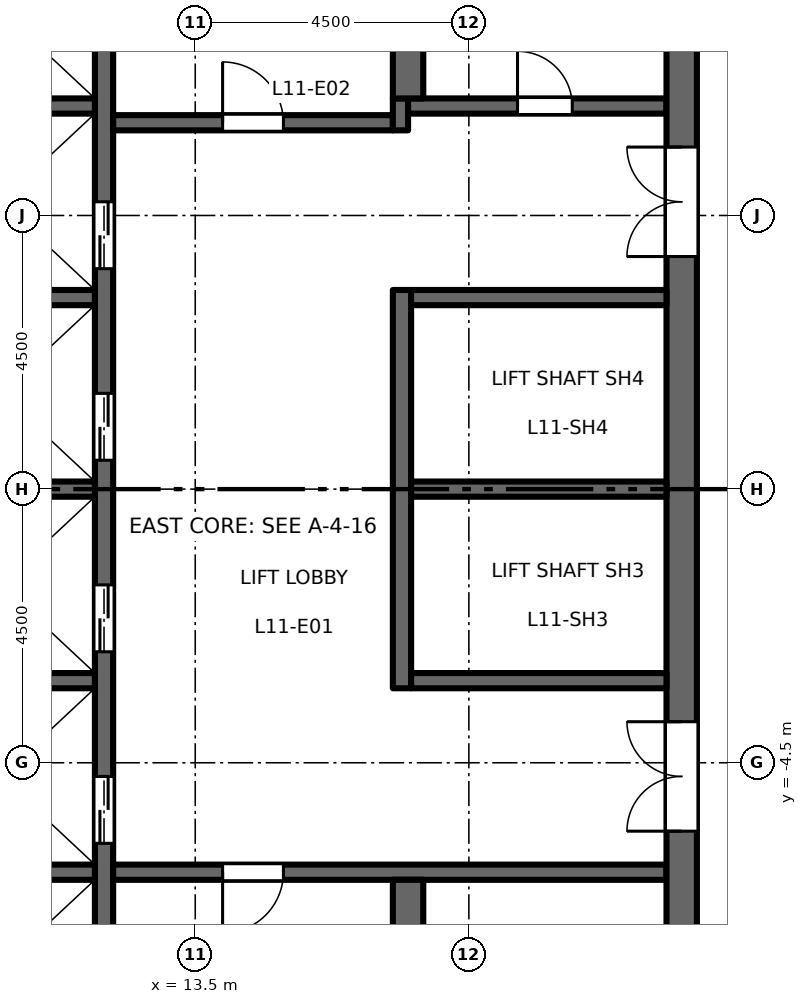
"""IFC4 building model, lengths in metres.
Left out: names, types, materials, properties, quantities, classifications, styles, units other than length and angle.
Written with IfcOpenShell. Run it as: python <this file> out.ifc"""

import sys

from ifc_helpers import new_model, si_unit, direction, frame, frame_2d, origin, place, context, subcontext, project, spatial, rectangle, extrude, element, fill, save


model = new_model("IFC4")
c1 = context("Model", 3, precision=1e-05, world=origin(), true_north=direction((0.0, 1.0)))
c2 = subcontext(c1, "Body", "Model", "MODEL_VIEW")
j1 = project(units=[si_unit("LENGTHUNIT", "METRE"), si_unit("PLANEANGLEUNIT", "RADIAN")], contexts=[c1])
p1 = place(None, origin())
s1 = spatial("IfcSite", under=j1, at=p1, CompositionType="ELEMENT")
p2 = place(p1, origin())
s2 = spatial("IfcBuilding", under=s1, at=p2, CompositionType="ELEMENT")
p3 = place(p2, frame((0.0, 0.0, 53.7)))
s3 = spatial("IfcBuildingStorey", under=s2, at=p3, CompositionType="ELEMENT", Elevation=53.7)
p4 = place(p3, frame((12.0, -9.45, 0.0), z_axis=(0.0, 0.0, 1.0), x_axis=(0.0, 1.0, 0.0)))
e1 = element("IfcWall", 1, at=p4, inside=s3, PredefinedType="SHEAR", context=c2, shape_type="SweptSolid", body=[
    extrude(rectangle(XDim=18.9, YDim=0.3, at=frame_2d((9.45, 0.0))), origin(), (0.0, 0.0, 1.0), 4.35),
])
p5 = place(p4, frame((3.625, 0.0, 0.0)))
e2 = element("IfcOpeningElement", 2, at=p5, cuts=e1, PredefinedType="OPENING", context=c2, shape_type="SweptSolid", body=[
    extrude(rectangle(XDim=1.1, YDim=2.1, at=frame_2d((0.55, 1.05))), frame((0.0, 0.16, 0.0), z_axis=(0.0, -1.0, 0.0), x_axis=(1.0, 0.0, 0.0)), (0.0, 0.0, 1.0), 0.32),
])
p6 = place(p4, frame((6.775, 0.0, 0.0)))
e3 = element("IfcOpeningElement", 3, at=p6, cuts=e1, PredefinedType="OPENING", context=c2, shape_type="SweptSolid", body=[
    extrude(rectangle(XDim=1.1, YDim=2.1, at=frame_2d((0.55, 1.05))), frame((0.0, 0.16, 0.0), z_axis=(0.0, -1.0, 0.0), x_axis=(1.0, 0.0, 0.0)), (0.0, 0.0, 1.0), 0.32),
])
p7 = place(p4, frame((9.925, 0.0, 0.0)))
e4 = element("IfcOpeningElement", 4, at=p7, cuts=e1, PredefinedType="OPENING", context=c2, shape_type="SweptSolid", body=[
    extrude(rectangle(XDim=1.1, YDim=2.1, at=frame_2d((0.55, 1.05))), frame((0.0, 0.16, 0.0), z_axis=(0.0, -1.0, 0.0), x_axis=(1.0, 0.0, 0.0)), (0.0, 0.0, 1.0), 0.32),
])
p8 = place(p4, frame((13.075, 0.0, 0.0)))
e5 = element("IfcOpeningElement", 5, at=p8, cuts=e1, PredefinedType="OPENING", context=c2, shape_type="SweptSolid", body=[
    extrude(rectangle(XDim=1.1, YDim=2.1, at=frame_2d((0.55, 1.05))), frame((0.0, 0.16, 0.0), z_axis=(0.0, -1.0, 0.0), x_axis=(1.0, 0.0, 0.0)), (0.0, 0.0, 1.0), 0.32),
])
p9 = place(p4, frame((16.725, 0.0, 0.0)))
e6 = element("IfcOpeningElement", 6, at=p9, cuts=e1, PredefinedType="OPENING", context=c2, shape_type="SweptSolid", body=[
    extrude(rectangle(XDim=1.2, YDim=2.1, at=frame_2d((0.6, 1.05))), frame((0.0, 0.16, 0.0), z_axis=(0.0, -1.0, 0.0), x_axis=(1.0, 0.0, 0.0)), (0.0, 0.0, 1.0), 0.32),
])
p10 = place(p4, frame((0.975, 0.0, 0.0)))
e7 = element("IfcOpeningElement", 7, at=p10, cuts=e1, PredefinedType="OPENING", context=c2, shape_type="SweptSolid", body=[
    extrude(rectangle(XDim=1.2, YDim=2.1, at=frame_2d((0.6, 1.05))), frame((0.0, 0.16, 0.0), z_axis=(0.0, -1.0, 0.0), x_axis=(1.0, 0.0, 0.0)), (0.0, 0.0, 1.0), 0.32),
])
p11 = place(p3, frame((12.15, 6.025, 0.0), z_axis=(0.0, 0.0, 1.0), x_axis=(1.0, 0.0, 0.0)))
e8 = element("IfcWall", 8, at=p11, inside=s3, PredefinedType="SHEAR", context=c2, shape_type="SweptSolid", body=[
    extrude(rectangle(XDim=4.6, YDim=0.25, at=frame_2d((2.3, 0.0))), origin(), (0.0, 0.0, 1.0), 4.35),
])
p12 = place(p11, frame((1.8, 0.0, 0.0)))
e9 = element("IfcOpeningElement", 9, at=p12, cuts=e8, PredefinedType="OPENING", context=c2, shape_type="SweptSolid", body=[
    extrude(rectangle(XDim=1.0, YDim=2.1, at=frame_2d((0.5, 1.05))), frame((0.0, 0.135, 0.0), z_axis=(0.0, -1.0, 0.0), x_axis=(1.0, 0.0, 0.0)), (0.0, 0.0, 1.0), 0.27),
])
p13 = place(p3, frame((16.875, 5.9, 0.0), z_axis=(0.0, 0.0, 1.0), x_axis=(0.0, 1.0, 0.0)))
e10 = element("IfcWall", 10, at=p13, inside=s3, PredefinedType="SHEAR", context=c2, shape_type="SweptSolid", body=[
    extrude(rectangle(XDim=0.525, YDim=0.25, at=frame_2d((0.263, 0.0))), origin(), (0.0, 0.0, 1.0), 4.35),
])
p14 = place(p3, frame((17.0, 6.3, 0.0), z_axis=(0.0, 0.0, 1.0), x_axis=(1.0, 0.0, 0.0)))
e11 = element("IfcWall", 11, at=p14, inside=s3, PredefinedType="SHEAR", context=c2, shape_type="SweptSolid", body=[
    extrude(rectangle(XDim=4.25, YDim=0.25, at=frame_2d((2.125, 0.0))), origin(), (0.0, 0.0, 1.0), 4.35),
])
p15 = place(p14, frame((1.8, 0.0, 0.0)))
e12 = element("IfcOpeningElement", 12, at=p15, cuts=e11, PredefinedType="OPENING", context=c2, shape_type="SweptSolid", body=[
    extrude(rectangle(XDim=0.9, YDim=2.1, at=frame_2d((0.45, 1.05))), frame((0.0, 0.135, 0.0), z_axis=(0.0, -1.0, 0.0), x_axis=(1.0, 0.0, 0.0)), (0.0, 0.0, 1.0), 0.27),
])
p16 = place(p3, frame((12.15, -6.3, 0.0), z_axis=(0.0, 0.0, 1.0), x_axis=(1.0, 0.0, 0.0)))
e13 = element("IfcWall", 13, at=p16, inside=s3, PredefinedType="SHEAR", context=c2, shape_type="SweptSolid", body=[
    extrude(rectangle(XDim=9.1, YDim=0.25, at=frame_2d((4.55, 0.0))), origin(), (0.0, 0.0, 1.0), 4.35),
])
p17 = place(p16, frame((1.8, 0.0, 0.0)))
e14 = element("IfcOpeningElement", 14, at=p17, cuts=e13, PredefinedType="OPENING", context=c2, shape_type="SweptSolid", body=[
    extrude(rectangle(XDim=1.0, YDim=2.1, at=frame_2d((0.5, 1.05))), frame((0.0, 0.135, 0.0), z_axis=(0.0, -1.0, 0.0), x_axis=(1.0, 0.0, 0.0)), (0.0, 0.0, 1.0), 0.27),
])
p18 = place(p3, frame((21.5, -13.0, 0.0), z_axis=(0.0, 0.0, 1.0), x_axis=(0.0, 1.0, 0.0)))
e15 = element("IfcWall", 15, at=p18, inside=s3, PredefinedType="SHEAR", context=c2, shape_type="SweptSolid", body=[
    extrude(rectangle(XDim=26.0, YDim=0.5, at=frame_2d((13.0, 0.0))), origin(), (0.0, 0.0, 1.0), 4.35),
])
p19 = place(p18, frame((16.825, 0.0, 0.0)))
e16 = element("IfcOpeningElement", 16, at=p19, cuts=e15, PredefinedType="OPENING", context=c2, shape_type="SweptSolid", body=[
    extrude(rectangle(XDim=1.8, YDim=2.1, at=frame_2d((0.9, 1.05))), frame((0.0, 0.26, 0.0), z_axis=(0.0, -1.0, 0.0), x_axis=(1.0, 0.0, 0.0)), (0.0, 0.0, 1.0), 0.52),
])
p20 = place(p18, frame((7.375, 0.0, 0.0)))
e17 = element("IfcOpeningElement", 17, at=p20, cuts=e15, PredefinedType="OPENING", context=c2, shape_type="SweptSolid", body=[
    extrude(rectangle(XDim=1.8, YDim=2.1, at=frame_2d((0.9, 1.05))), frame((0.0, 0.26, 0.0), z_axis=(0.0, -1.0, 0.0), x_axis=(1.0, 0.0, 0.0)), (0.0, 0.0, 1.0), 0.52),
])
p21 = place(p18, frame((2.65, 0.0, 0.0)))
e18 = element("IfcOpeningElement", 18, at=p21, cuts=e15, PredefinedType="OPENING", context=c2, shape_type="SweptSolid", body=[
    extrude(rectangle(XDim=0.9, YDim=2.1, at=frame_2d((0.45, 1.05))), frame((0.0, 0.26, 0.0), z_axis=(0.0, -1.0, 0.0), x_axis=(1.0, 0.0, 0.0)), (0.0, 0.0, 1.0), 0.52),
])
p22 = place(p3, frame((16.9, -3.275, 0.0), z_axis=(0.0, 0.0, 1.0), x_axis=(0.0, 1.0, 0.0)))
e19 = element("IfcWall", 19, at=p22, inside=s3, PredefinedType="SHEAR", context=c2, shape_type="SweptSolid", body=[
    extrude(rectangle(XDim=6.55, YDim=0.3, at=frame_2d((3.275, 0.0))), origin(), (0.0, 0.0, 1.0), 4.35),
])
for number, where, z_axis, x_axis in (
    (20, (17.05, 0.0, 0.0), (0.0, 0.0, 1.0), (1.0, 0.0, 0.0)),
    (21, (17.05, 3.15, 0.0), (0.0, 0.0, 1.0), (1.0, 0.0, 0.0)),
    (22, (17.05, -3.15, 0.0), (0.0, 0.0, 1.0), (1.0, 0.0, 0.0)),
):
    element("IfcWall", number, at=place(p3, frame(where, z_axis=z_axis, x_axis=x_axis)), inside=s3, PredefinedType="SHEAR", context=c2, shape_type="SweptSolid", body=[
        extrude(rectangle(XDim=4.2, YDim=0.25, at=frame_2d((2.1, 0.0))), origin(), (0.0, 0.0, 1.0), 4.35),
    ])
for number, where, z_axis, x_axis in (
    (23, (17.0, 6.425, 0.0), (0.0, 0.0, 1.0), (0.0, 1.0, 0.0)),
    (24, (17.0, -13.0, 0.0), (0.0, 0.0, 1.0), (0.0, 1.0, 0.0)),
):
    element("IfcWall", number, at=place(p3, frame(where, z_axis=z_axis, x_axis=x_axis)), inside=s3, PredefinedType="SHEAR", context=c2, shape_type="SweptSolid", body=[
        extrude(rectangle(XDim=6.575, YDim=0.5, at=frame_2d((3.288, 0.0))), origin(), (0.0, 0.0, 1.0), 4.35),
    ])
for number, where, z_axis, x_axis in (
    (25, (8.75, 0.0, 0.0), (0.0, 0.0, 1.0), (1.0, 0.0, 0.0)),
    (26, (8.75, 3.15, 0.0), (0.0, 0.0, 1.0), (1.0, 0.0, 0.0)),
    (27, (8.75, 6.3, 0.0), (0.0, 0.0, 1.0), (1.0, 0.0, 0.0)),
    (28, (8.75, -3.15, 0.0), (0.0, 0.0, 1.0), (1.0, 0.0, 0.0)),
    (29, (8.75, -6.3, 0.0), (0.0, 0.0, 1.0), (1.0, 0.0, 0.0)),
):
    element("IfcWall", number, at=place(p3, frame(where, z_axis=z_axis, x_axis=x_axis)), inside=s3, PredefinedType="SHEAR", context=c2, shape_type="SweptSolid", body=[
        extrude(rectangle(XDim=3.1, YDim=0.25, at=frame_2d((1.55, 0.0))), origin(), (0.0, 0.0, 1.0), 4.35),
    ])
p23 = place(p12, origin())
e30 = element("IfcDoor", 30, at=p23, inside=s3, OperationType="SINGLE_SWING_RIGHT", PredefinedType="DOOR", context=c2, shape_type="SweptSolid", body=[
    extrude(rectangle(XDim=1.0, YDim=2.1, at=frame_2d((0.5, 1.05))), frame((0.0, 0.025, 0.0), z_axis=(0.0, -1.0, 0.0), x_axis=(1.0, 0.0, 0.0)), (0.0, 0.0, 1.0), 0.05),
])
fill(e9, e30)
p24 = place(p17, origin())
e31 = element("IfcDoor", 31, at=p24, inside=s3, OperationType="SINGLE_SWING_LEFT", PredefinedType="DOOR", context=c2, shape_type="SweptSolid", body=[
    extrude(rectangle(XDim=1.0, YDim=2.1, at=frame_2d((0.5, 1.05))), frame((0.0, 0.025, 0.0), z_axis=(0.0, -1.0, 0.0), x_axis=(1.0, 0.0, 0.0)), (0.0, 0.0, 1.0), 0.05),
])
fill(e14, e31)
p25 = place(p19, origin())
e32 = element("IfcDoor", 32, at=p25, inside=s3, OperationType="DOUBLE_DOOR_DOUBLE_SWING", PredefinedType="DOOR", context=c2, shape_type="SweptSolid", body=[
    extrude(rectangle(XDim=1.8, YDim=2.1, at=frame_2d((0.9, 1.05))), frame((0.0, 0.025, 0.0), z_axis=(0.0, -1.0, 0.0), x_axis=(1.0, 0.0, 0.0)), (0.0, 0.0, 1.0), 0.05),
])
fill(e16, e32)
p26 = place(p20, origin())
e33 = element("IfcDoor", 33, at=p26, inside=s3, OperationType="DOUBLE_DOOR_DOUBLE_SWING", PredefinedType="DOOR", context=c2, shape_type="SweptSolid", body=[
    extrude(rectangle(XDim=1.8, YDim=2.1, at=frame_2d((0.9, 1.05))), frame((0.0, 0.025, 0.0), z_axis=(0.0, -1.0, 0.0), x_axis=(1.0, 0.0, 0.0)), (0.0, 0.0, 1.0), 0.05),
])
fill(e17, e33)
p27 = place(p5, origin())
e34 = element("IfcDoor", 34, at=p27, inside=s3, OperationType="DOUBLE_DOOR_SLIDING", PredefinedType="DOOR", context=c2, shape_type="SweptSolid", body=[
    extrude(rectangle(XDim=1.1, YDim=2.1, at=frame_2d((0.55, 1.05))), frame((0.0, 0.025, 0.0), z_axis=(0.0, -1.0, 0.0), x_axis=(1.0, 0.0, 0.0)), (0.0, 0.0, 1.0), 0.05),
])
fill(e2, e34)
p28 = place(p6, origin())
e35 = element("IfcDoor", 35, at=p28, inside=s3, OperationType="DOUBLE_DOOR_SLIDING", PredefinedType="DOOR", context=c2, shape_type="SweptSolid", body=[
    extrude(rectangle(XDim=1.1, YDim=2.1, at=frame_2d((0.55, 1.05))), frame((0.0, 0.025, 0.0), z_axis=(0.0, -1.0, 0.0), x_axis=(1.0, 0.0, 0.0)), (0.0, 0.0, 1.0), 0.05),
])
fill(e3, e35)
p29 = place(p7, origin())
e36 = element("IfcDoor", 36, at=p29, inside=s3, OperationType="DOUBLE_DOOR_SLIDING", PredefinedType="DOOR", context=c2, shape_type="SweptSolid", body=[
    extrude(rectangle(XDim=1.1, YDim=2.1, at=frame_2d((0.55, 1.05))), frame((0.0, 0.025, 0.0), z_axis=(0.0, -1.0, 0.0), x_axis=(1.0, 0.0, 0.0)), (0.0, 0.0, 1.0), 0.05),
])
fill(e4, e36)
p30 = place(p8, origin())
e37 = element("IfcDoor", 37, at=p30, inside=s3, OperationType="DOUBLE_DOOR_SLIDING", PredefinedType="DOOR", context=c2, shape_type="SweptSolid", body=[
    extrude(rectangle(XDim=1.1, YDim=2.1, at=frame_2d((0.55, 1.05))), frame((0.0, 0.025, 0.0), z_axis=(0.0, -1.0, 0.0), x_axis=(1.0, 0.0, 0.0)), (0.0, 0.0, 1.0), 0.05),
])
fill(e5, e37)
p31 = place(p15, origin())
e38 = element("IfcDoor", 38, at=p31, inside=s3, OperationType="SINGLE_SWING_RIGHT", PredefinedType="DOOR", context=c2, shape_type="SweptSolid", body=[
    extrude(rectangle(XDim=0.9, YDim=2.1, at=frame_2d((0.45, 1.05))), frame((0.0, 0.025, 0.0), z_axis=(0.0, -1.0, 0.0), x_axis=(1.0, 0.0, 0.0)), (0.0, 0.0, 1.0), 0.05),
])
fill(e12, e38)
save(model, sys.argv[1])
